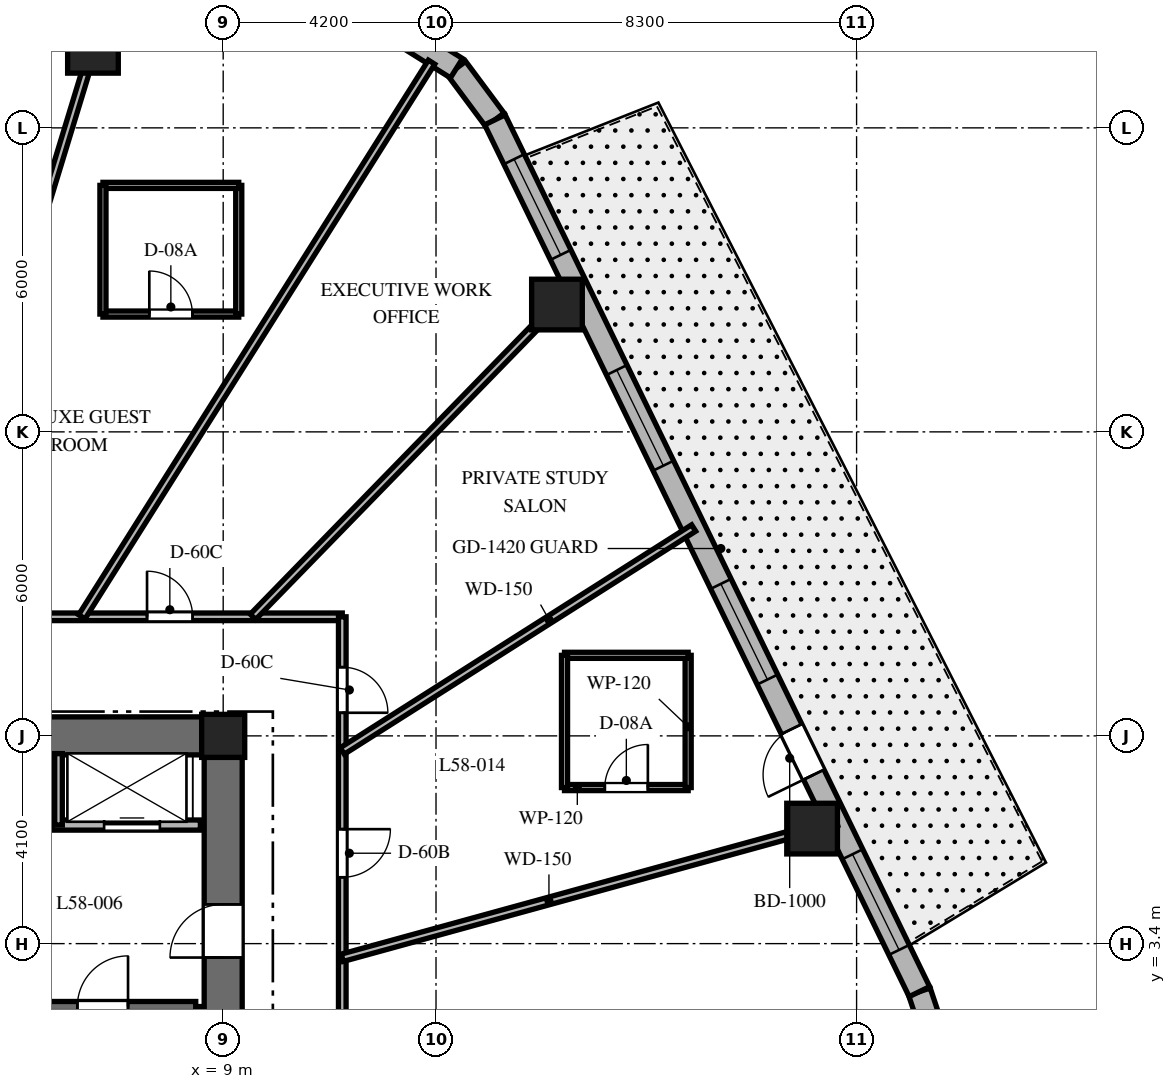
"""IFC4 building model, lengths in metres.
Left out: names, types, materials, properties, quantities, classifications, styles, units other than length and angle.
Written with IfcOpenShell. Run it as: python <this file> out.ifc"""

import sys

from ifc_helpers import new_model, si_unit, direction, frame, frame_2d, origin, origin_2d, place, context, subcontext, project, spatial, rectangle, extrude, element, fill, save


model = new_model("IFC4")
c1 = context("Model", 3, precision=1e-05, world=origin(), true_north=direction((0.0, 1.0)))
c2 = subcontext(c1, "Body", "Model", "MODEL_VIEW")
j1 = project(units=[si_unit("LENGTHUNIT", "METRE"), si_unit("PLANEANGLEUNIT", "RADIAN")], contexts=[c1])
p1 = place(None, origin())
s1 = spatial("IfcSite", under=j1, at=p1, CompositionType="ELEMENT")
p2 = place(p1, origin())
s2 = spatial("IfcBuilding", under=s1, at=p2, CompositionType="ELEMENT")
p3 = place(p2, frame((0.0, 0.0, 233.1)))
s3 = spatial("IfcBuildingStorey", under=s2, at=p3, CompositionType="ELEMENT", Elevation=233.1)
p4 = place(p3, frame((1.85, 7.5, 0.0), z_axis=(0.0, 0.0, 1.0), x_axis=(1.0, 0.0, 0.0)))
e1 = element("IfcWall", 1, at=p4, inside=s3, PredefinedType="SHEAR", context=c2, shape_type="SweptSolid", body=[
    extrude(rectangle(XDim=7.525, YDim=0.75, at=frame_2d((3.762, 0.0))), origin(), (0.0, 0.0, 1.0), 3.8),
])
p5 = place(p3, frame((9.0, -7.125, 0.0), z_axis=(0.0, 0.0, 1.0), x_axis=(0.0, 1.0, 0.0)))
e2 = element("IfcWall", 2, at=p5, inside=s3, PredefinedType="SHEAR", context=c2, shape_type="SweptSolid", body=[
    extrude(rectangle(XDim=14.25, YDim=0.75, at=frame_2d((7.125, 0.0))), origin(), (0.0, 0.0, 1.0), 3.8),
])
p6 = place(p5, frame((10.25, 0.0, 0.0)))
e3 = element("IfcOpeningElement", 3, at=p6, cuts=e2, PredefinedType="OPENING", context=c2, shape_type="SweptSolid", body=[
    extrude(rectangle(XDim=1.05, YDim=2.15, at=frame_2d((0.525, 1.075))), frame((0.0, 0.385, 0.0), z_axis=(0.0, -1.0, 0.0), x_axis=(1.0, 0.0, 0.0)), (0.0, 0.0, 1.0), 0.77),
])
p7 = place(p3, frame((8.458, -6.985, 0.0), z_axis=(0.0, 0.0, 1.0), x_axis=(0.0, 1.0, 0.0)))
e4 = element("IfcWall", 4, at=p7, inside=s3, PredefinedType="SHEAR", context=c2, shape_type="SweptSolid", body=[
    extrude(rectangle(XDim=9.143, YDim=0.2, at=frame_2d((4.572, 0.0))), origin(), (0.0, 0.0, 1.0), 3.8),
])
p8 = place(p3, frame((4.772, 2.158, 0.0), z_axis=(0.0, 0.0, 1.0), x_axis=(1.0, 0.0, 0.0)))
e5 = element("IfcWall", 5, at=p8, inside=s3, PredefinedType="SHEAR", context=c2, shape_type="SweptSolid", body=[
    extrude(rectangle(XDim=3.686, YDim=0.2, at=frame_2d((1.843, 0.0))), origin(), (0.0, 0.0, 1.0), 3.8),
])
p9 = place(p8, frame((1.35, 0.0, 0.0)))
e6 = element("IfcOpeningElement", 6, at=p9, cuts=e5, PredefinedType="OPENING", context=c2, shape_type="SweptSolid", body=[
    extrude(rectangle(XDim=1.0, YDim=2.15, at=frame_2d((0.5, 1.075))), frame((0.0, 0.11, 0.0), z_axis=(0.0, -1.0, 0.0), x_axis=(1.0, 0.0, 0.0)), (0.0, 0.0, 1.0), 0.22),
])
p10 = place(p3, frame((9.0, 7.5, 0.0), z_axis=(0.0, 0.0, 1.0), x_axis=(1.0, 0.0, 0.0)))
e7 = element("IfcColumn", 7, at=p10, inside=s3, PredefinedType="COLUMN", context=c2, shape_type="SweptSolid", body=[
    extrude(rectangle(XDim=0.85, YDim=0.85, at=origin_2d()), origin(), (0.0, 0.0, 1.0), 3.8),
])
for number, where, z_axis, x_axis in (
    (8, (20.622, 5.67, 0.0), (0.0, 0.0, 1.0), (1.0, 0.0, 0.0)),
    (9, (15.587, 16.013, 0.0), (0.0, 0.0, 1.0), (1.0, 0.0, 0.0)),
    (10, (6.43, 21.08, 0.0), (0.0, 0.0, 1.0), (1.0, 0.0, 0.0)),
):
    element("IfcColumn", number, at=place(p3, frame(where, z_axis=z_axis, x_axis=x_axis)), inside=s3, PredefinedType="COLUMN", context=c2, shape_type="SweptSolid", body=[
        extrude(rectangle(XDim=1.0, YDim=1.0, at=origin_2d()), origin(), (0.0, 0.0, 1.0), 3.8),
    ])
p11 = place(p3, frame((23.023, 1.604, 0.0), z_axis=(0.0, 0.0, 1.0), x_axis=(-0.316801227695, 0.948491951537, 0.0)))
e11 = element("IfcWall", 11, at=p11, inside=s3, PredefinedType="SOLIDWALL", context=c2, shape_type="SweptSolid", body=[
    extrude(rectangle(XDim=0.894, YDim=0.45, at=frame_2d((0.447, 0.0))), origin(), (0.0, 0.0, 1.0), 3.5),
])
p12 = place(p3, frame((14.362, 19.658, 0.0), z_axis=(0.0, 0.0, 1.0), x_axis=(-0.596642462792, 0.80250717853, 0.0)))
e12 = element("IfcWall", 12, at=p12, inside=s3, PredefinedType="SOLIDWALL", context=c2, shape_type="SweptSolid", body=[
    extrude(rectangle(XDim=1.27, YDim=0.45, at=frame_2d((0.635, 0.0))), origin(), (0.0, 0.0, 1.0), 3.5),
])
p13 = place(p3, frame((13.604, 20.678, 0.0), z_axis=(0.0, 0.0, 1.0), x_axis=(-0.847910404124, 0.53013955387, 0.0)))
e13 = element("IfcWall", 13, at=p13, inside=s3, PredefinedType="SOLIDWALL", context=c2, shape_type="SweptSolid", body=[
    extrude(rectangle(XDim=1.249, YDim=0.45, at=frame_2d((0.624, 0.0))), origin(), (0.0, 0.0, 1.0), 3.5),
])
p14 = place(p3, frame((22.74, 2.452, 0.0), z_axis=(0.0, 0.0, 1.0), x_axis=(-0.437753424814, 0.899095066755, 0.0)))
e14 = element("IfcWall", 14, at=p14, inside=s3, PredefinedType="SOLIDWALL", context=c2, shape_type="SweptSolid", body=[
    extrude(rectangle(XDim=19.137, YDim=0.45, at=frame_2d((9.569, 0.0))), origin(), (0.0, 0.0, 1.0), 3.5),
])
p15 = place(p14, frame((4.763, 0.0, 0.0)))
e15 = element("IfcOpeningElement", 15, at=p15, cuts=e14, PredefinedType="OPENING", context=c2, shape_type="SweptSolid", body=[
    extrude(rectangle(XDim=1.0, YDim=2.15, at=frame_2d((0.5, 1.075))), frame((0.0, 0.235, 0.0), z_axis=(0.0, -1.0, 0.0), x_axis=(1.0, 0.0, 0.0)), (0.0, 0.0, 1.0), 0.47),
])
p16 = place(p14, frame((6.851, 0.0, 0.8)))
e16 = element("IfcOpeningElement", 16, at=p16, cuts=e14, PredefinedType="OPENING", context=c2, shape_type="SweptSolid", body=[
    extrude(rectangle(XDim=2.1, YDim=1.85, at=frame_2d((1.05, 0.925))), frame((0.0, 0.235, 0.0), z_axis=(0.0, -1.0, 0.0), x_axis=(1.0, 0.0, 0.0)), (0.0, 0.0, 1.0), 0.47),
])
p17 = place(p14, frame((11.545, 0.0, 0.8)))
e17 = element("IfcOpeningElement", 17, at=p17, cuts=e14, PredefinedType="OPENING", context=c2, shape_type="SweptSolid", body=[
    extrude(rectangle(XDim=2.1, YDim=1.85, at=frame_2d((1.05, 0.925))), frame((0.0, 0.235, 0.0), z_axis=(0.0, -1.0, 0.0), x_axis=(1.0, 0.0, 0.0)), (0.0, 0.0, 1.0), 0.47),
])
p18 = place(p14, frame((16.173, 0.0, 0.8)))
e18 = element("IfcOpeningElement", 18, at=p18, cuts=e14, PredefinedType="OPENING", context=c2, shape_type="SweptSolid", body=[
    extrude(rectangle(XDim=2.1, YDim=1.85, at=frame_2d((1.05, 0.925))), frame((0.0, 0.235, 0.0), z_axis=(0.0, -1.0, 0.0), x_axis=(1.0, 0.0, 0.0)), (0.0, 0.0, 1.0), 0.47),
])
p19 = place(p14, frame((0.916, 0.0, 0.8)))
e19 = element("IfcOpeningElement", 19, at=p19, cuts=e14, PredefinedType="OPENING", context=c2, shape_type="SweptSolid", body=[
    extrude(rectangle(XDim=2.1, YDim=1.85, at=frame_2d((1.05, 0.925))), frame((0.0, 0.235, 0.0), z_axis=(0.0, -1.0, 0.0), x_axis=(1.0, 0.0, 0.0)), (0.0, 0.0, 1.0), 0.47),
])
p20 = place(p3, frame((4.5, 5.74, 0.0), z_axis=(0.0, 0.0, 1.0), x_axis=(1.0, 0.0, 0.0)))
e20 = element("IfcWall", 20, at=p20, inside=s3, PredefinedType="PARTITIONING", context=c2, shape_type="SweptSolid", body=[
    extrude(rectangle(XDim=4.05, YDim=0.2, at=frame_2d((2.025, 0.0))), origin(), (0.0, 0.0, 1.0), 3.5),
])
p21 = place(p20, frame((0.3, 0.0, 0.0)))
e21 = element("IfcOpeningElement", 21, at=p21, cuts=e20, PredefinedType="OPENING", context=c2, shape_type="SweptSolid", body=[
    extrude(rectangle(XDim=0.85, YDim=2.03, at=frame_2d((0.425, 1.015))), frame((0.0, 0.11, 0.0), z_axis=(0.0, -1.0, 0.0), x_axis=(1.0, 0.0, 0.0)), (0.0, 0.0, 1.0), 0.22),
])
p22 = place(p20, frame((2.15, 0.0, 0.0)))
e22 = element("IfcOpeningElement", 22, at=p22, cuts=e20, PredefinedType="OPENING", context=c2, shape_type="SweptSolid", body=[
    extrude(rectangle(XDim=1.1, YDim=2.2, at=frame_2d((0.55, 1.1))), frame((0.0, 0.11, 0.0), z_axis=(0.0, -1.0, 0.0), x_axis=(1.0, 0.0, 0.0)), (0.0, 0.0, 1.0), 0.22),
])
p23 = place(p3, frame((5.75, 5.74, 0.0), z_axis=(0.0, 0.0, 1.0), x_axis=(0.0, 1.0, 0.0)))
e23 = element("IfcWall", 23, at=p23, inside=s3, PredefinedType="PARTITIONING", context=c2, shape_type="SweptSolid", body=[
    extrude(rectangle(XDim=1.41, YDim=0.15, at=frame_2d((0.705, 0.0))), origin(), (0.0, 0.0, 1.0), 3.5),
])
p24 = place(p3, frame((0.92, 9.85, 0.0), z_axis=(0.0, 0.0, 1.0), x_axis=(1.0, 0.0, 0.0)))
e24 = element("IfcWall", 24, at=p24, inside=s3, PredefinedType="PARTITIONING", context=c2, shape_type="SweptSolid", body=[
    extrude(rectangle(XDim=10.43, YDim=0.15, at=frame_2d((5.215, 0.0))), origin(), (0.0, 0.0, 1.0), 2.99),
])
p25 = place(p24, frame((6.577, 0.0, 0.0)))
e25 = element("IfcOpeningElement", 25, at=p25, cuts=e24, PredefinedType="OPENING", context=c2, shape_type="SweptSolid", body=[
    extrude(rectangle(XDim=0.9, YDim=2.03, at=frame_2d((0.45, 1.015))), frame((0.0, 0.085, 0.0), z_axis=(0.0, -1.0, 0.0), x_axis=(1.0, 0.0, 0.0)), (0.0, 0.0, 1.0), 0.17),
])
p26 = place(p24, frame((3.234, 0.0, 0.0)))
e26 = element("IfcOpeningElement", 26, at=p26, cuts=e24, PredefinedType="OPENING", context=c2, shape_type="SweptSolid", body=[
    extrude(rectangle(XDim=0.95, YDim=2.03, at=frame_2d((0.475, 1.015))), frame((0.0, 0.085, 0.0), z_axis=(0.0, -1.0, 0.0), x_axis=(1.0, 0.0, 0.0)), (0.0, 0.0, 1.0), 0.17),
])
p27 = place(p3, frame((11.35, 9.85, 0.0), z_axis=(0.0, 0.0, 1.0), x_axis=(0.0, -1.0, 0.0)))
e27 = element("IfcWall", 27, at=p27, inside=s3, PredefinedType="PARTITIONING", context=c2, shape_type="SweptSolid", body=[
    extrude(rectangle(XDim=12.4, YDim=0.15, at=frame_2d((6.2, 0.0))), origin(), (0.0, 0.0, 1.0), 2.99),
])
p28 = place(p27, frame((4.191, 0.0, 0.0)))
e28 = element("IfcOpeningElement", 28, at=p28, cuts=e27, PredefinedType="OPENING", context=c2, shape_type="SweptSolid", body=[
    extrude(rectangle(XDim=0.95, YDim=2.03, at=frame_2d((0.475, 1.015))), frame((0.0, 0.085, 0.0), z_axis=(0.0, -1.0, 0.0), x_axis=(1.0, 0.0, 0.0)), (0.0, 0.0, 1.0), 0.17),
])
p29 = place(p27, frame((0.994, 0.0, 0.0)))
e29 = element("IfcOpeningElement", 29, at=p29, cuts=e27, PredefinedType="OPENING", context=c2, shape_type="SweptSolid", body=[
    extrude(rectangle(XDim=0.9, YDim=2.03, at=frame_2d((0.45, 1.015))), frame((0.0, 0.085, 0.0), z_axis=(0.0, -1.0, 0.0), x_axis=(1.0, 0.0, 0.0)), (0.0, 0.0, 1.0), 0.17),
])
p30 = place(p27, frame((8.835, 0.0, 0.0)))
e30 = element("IfcOpeningElement", 30, at=p30, cuts=e27, PredefinedType="OPENING", context=c2, shape_type="SweptSolid", body=[
    extrude(rectangle(XDim=0.95, YDim=2.03, at=frame_2d((0.475, 1.015))), frame((0.0, 0.085, 0.0), z_axis=(0.0, -1.0, 0.0), x_axis=(1.0, 0.0, 0.0)), (0.0, 0.0, 1.0), 0.17),
])
p31 = place(p3, frame((11.35, 3.121, 0.0), z_axis=(0.0, 0.0, 1.0), x_axis=(0.964212793822, 0.265129568758, 0.0)))
e31 = element("IfcWall", 31, at=p31, inside=s3, PredefinedType="PARTITIONING", context=c2, shape_type="SweptSolid", body=[
    extrude(rectangle(XDim=10.12, YDim=0.15, at=frame_2d((5.06, 0.0))), origin(), (0.0, 0.0, 1.0), 2.74),
])
p32 = place(p3, frame((11.35, 7.202, 0.0), z_axis=(0.0, 0.0, 1.0), x_axis=(0.844364592263, 0.535769013039, 0.0)))
e32 = element("IfcWall", 32, at=p32, inside=s3, PredefinedType="PARTITIONING", context=c2, shape_type="SweptSolid", body=[
    extrude(rectangle(XDim=8.213, YDim=0.15, at=frame_2d((4.106, 0.0))), origin(), (0.0, 0.0, 1.0), 2.74),
])
p33 = place(p3, frame((9.588, 9.85, 0.0), z_axis=(0.0, 0.0, 1.0), x_axis=(0.697519469595, 0.716565830567, 0.0)))
e33 = element("IfcWall", 33, at=p33, inside=s3, PredefinedType="PARTITIONING", context=c2, shape_type="SweptSolid", body=[
    extrude(rectangle(XDim=9.126, YDim=0.15, at=frame_2d((4.563, 0.0))), origin(), (0.0, 0.0, 1.0), 2.74),
])
p34 = place(p3, frame((6.21, 9.85, 0.0), z_axis=(0.0, 0.0, 1.0), x_axis=(0.533335553786, 0.84590376939, 0.0)))
e34 = element("IfcWall", 34, at=p34, inside=s3, PredefinedType="PARTITIONING", context=c2, shape_type="SweptSolid", body=[
    extrude(rectangle(XDim=12.941, YDim=0.15, at=frame_2d((6.47, 0.0))), origin(), (0.0, 0.0, 1.0), 2.74),
])
p35 = place(p3, frame((3.004, 9.85, 0.0), z_axis=(0.0, 0.0, 1.0), x_axis=(0.291775760688, 0.956486751333, 0.0)))
e35 = element("IfcWall", 35, at=p35, inside=s3, PredefinedType="PARTITIONING", context=c2, shape_type="SweptSolid", body=[
    extrude(rectangle(XDim=12.258, YDim=0.15, at=frame_2d((6.129, 0.0))), origin(), (0.0, 0.0, 1.0), 2.74),
])
p36 = place(p3, frame((15.736, 6.48, 0.0), z_axis=(0.0, 0.0, 1.0), x_axis=(1.0, 0.0, 0.0)))
e36 = element("IfcWall", 36, at=p36, inside=s3, PredefinedType="PARTITIONING", context=c2, shape_type="SweptSolid", body=[
    extrude(rectangle(XDim=2.44, YDim=0.12, at=frame_2d((1.22, 0.0))), origin(), (0.0, 0.0, 1.0), 2.99),
])
p37 = place(p36, frame((0.795, 0.0, 0.0)))
e37 = element("IfcOpeningElement", 37, at=p37, cuts=e36, PredefinedType="OPENING", context=c2, shape_type="SweptSolid", body=[
    extrude(rectangle(XDim=0.85, YDim=2.03, at=frame_2d((0.425, 1.015))), frame((0.0, 0.07, 0.0), z_axis=(0.0, -1.0, 0.0), x_axis=(1.0, 0.0, 0.0)), (0.0, 0.0, 1.0), 0.14),
])
p38 = place(p3, frame((18.176, 6.48, 0.0), z_axis=(0.0, 0.0, 1.0), x_axis=(0.0, 1.0, 0.0)))
e38 = element("IfcWall", 38, at=p38, inside=s3, PredefinedType="PARTITIONING", context=c2, shape_type="SweptSolid", body=[
    extrude(rectangle(XDim=2.61, YDim=0.12, at=frame_2d((1.305, 0.0))), origin(), (0.0, 0.0, 1.0), 3.5),
])
p39 = place(p3, frame((18.176, 9.09, 0.0), z_axis=(0.0, 0.0, 1.0), x_axis=(-1.0, 0.0, 0.0)))
e39 = element("IfcWall", 39, at=p39, inside=s3, PredefinedType="PARTITIONING", context=c2, shape_type="SweptSolid", body=[
    extrude(rectangle(XDim=2.44, YDim=0.12, at=frame_2d((1.22, 0.0))), origin(), (0.0, 0.0, 1.0), 3.5),
])
p40 = place(p3, frame((15.736, 9.09, 0.0), z_axis=(0.0, 0.0, 1.0), x_axis=(0.0, -1.0, 0.0)))
e40 = element("IfcWall", 40, at=p40, inside=s3, PredefinedType="PARTITIONING", context=c2, shape_type="SweptSolid", body=[
    extrude(rectangle(XDim=2.61, YDim=0.12, at=frame_2d((1.305, 0.0))), origin(), (0.0, 0.0, 1.0), 2.99),
])
p41 = place(p3, frame((6.627, 15.825, 0.0), z_axis=(0.0, 0.0, 1.0), x_axis=(1.0, 0.0, 0.0)))
e41 = element("IfcWall", 41, at=p41, inside=s3, PredefinedType="PARTITIONING", context=c2, shape_type="SweptSolid", body=[
    extrude(rectangle(XDim=2.68, YDim=0.12, at=frame_2d((1.34, 0.0))), origin(), (0.0, 0.0, 1.0), 3.072),
])
p42 = place(p41, frame((0.915, 0.0, 0.0)))
e42 = element("IfcOpeningElement", 42, at=p42, cuts=e41, PredefinedType="OPENING", context=c2, shape_type="SweptSolid", body=[
    extrude(rectangle(XDim=0.85, YDim=2.03, at=frame_2d((0.425, 1.015))), frame((0.0, 0.07, 0.0), z_axis=(0.0, -1.0, 0.0), x_axis=(1.0, 0.0, 0.0)), (0.0, 0.0, 1.0), 0.14),
])
p43 = place(p3, frame((9.307, 15.825, 0.0), z_axis=(0.0, 0.0, 1.0), x_axis=(0.0, 1.0, 0.0)))
e43 = element("IfcWall", 43, at=p43, inside=s3, PredefinedType="PARTITIONING", context=c2, shape_type="SweptSolid", body=[
    extrude(rectangle(XDim=2.54, YDim=0.12, at=frame_2d((1.27, 0.0))), origin(), (0.0, 0.0, 1.0), 3.5),
])
p44 = place(p3, frame((9.307, 18.365, 0.0), z_axis=(0.0, 0.0, 1.0), x_axis=(-1.0, 0.0, 0.0)))
e44 = element("IfcWall", 44, at=p44, inside=s3, PredefinedType="PARTITIONING", context=c2, shape_type="SweptSolid", body=[
    extrude(rectangle(XDim=2.68, YDim=0.12, at=frame_2d((1.34, 0.0))), origin(), (0.0, 0.0, 1.0), 3.5),
])
p45 = place(p3, frame((6.627, 18.365, 0.0), z_axis=(0.0, 0.0, 1.0), x_axis=(0.0, -1.0, 0.0)))
e45 = element("IfcWall", 45, at=p45, inside=s3, PredefinedType="PARTITIONING", context=c2, shape_type="SweptSolid", body=[
    extrude(rectangle(XDim=2.54, YDim=0.12, at=frame_2d((1.27, 0.0))), origin(), (0.0, 0.0, 1.0), 3.072),
])
p46 = place(p15, origin())
e46 = element("IfcDoor", 46, at=p46, inside=s3, OperationType="SINGLE_SWING_LEFT", PredefinedType="DOOR", context=c2, shape_type="SweptSolid", body=[
    extrude(rectangle(XDim=1.0, YDim=2.15, at=frame_2d((0.5, 1.075))), frame((0.0, 0.025, 0.0), z_axis=(0.0, -1.0, 0.0), x_axis=(1.0, 0.0, 0.0)), (0.0, 0.0, 1.0), 0.05),
])
fill(e15, e46)
p47 = place(p16, origin())
e47 = element("IfcWindow", 47, at=p47, inside=s3, PartitioningType="SINGLE_PANEL", PredefinedType="WINDOW", context=c2, shape_type="SweptSolid", body=[
    extrude(rectangle(XDim=2.1, YDim=1.85, at=frame_2d((1.05, 0.925))), frame((0.0, 0.03, 0.0), z_axis=(0.0, -1.0, 0.0), x_axis=(1.0, 0.0, 0.0)), (0.0, 0.0, 1.0), 0.06),
])
fill(e16, e47)
p48 = place(p17, origin())
e48 = element("IfcWindow", 48, at=p48, inside=s3, PartitioningType="SINGLE_PANEL", PredefinedType="WINDOW", context=c2, shape_type="SweptSolid", body=[
    extrude(rectangle(XDim=2.1, YDim=1.85, at=frame_2d((1.05, 0.925))), frame((0.0, 0.03, 0.0), z_axis=(0.0, -1.0, 0.0), x_axis=(1.0, 0.0, 0.0)), (0.0, 0.0, 1.0), 0.06),
])
fill(e17, e48)
p49 = place(p18, origin())
e49 = element("IfcWindow", 49, at=p49, inside=s3, PartitioningType="SINGLE_PANEL", PredefinedType="WINDOW", context=c2, shape_type="SweptSolid", body=[
    extrude(rectangle(XDim=2.1, YDim=1.85, at=frame_2d((1.05, 0.925))), frame((0.0, 0.03, 0.0), z_axis=(0.0, -1.0, 0.0), x_axis=(1.0, 0.0, 0.0)), (0.0, 0.0, 1.0), 0.06),
])
fill(e18, e49)
p50 = place(p19, origin())
e50 = element("IfcWindow", 50, at=p50, inside=s3, PartitioningType="SINGLE_PANEL", PredefinedType="WINDOW", context=c2, shape_type="SweptSolid", body=[
    extrude(rectangle(XDim=2.1, YDim=1.85, at=frame_2d((1.05, 0.925))), frame((0.0, 0.03, 0.0), z_axis=(0.0, -1.0, 0.0), x_axis=(1.0, 0.0, 0.0)), (0.0, 0.0, 1.0), 0.06),
])
fill(e19, e50)
p51 = place(p9, origin())
e51 = element("IfcDoor", 51, at=p51, inside=s3, OperationType="SINGLE_SWING_RIGHT", PredefinedType="DOOR", context=c2, shape_type="SweptSolid", body=[
    extrude(rectangle(XDim=1.0, YDim=2.15, at=frame_2d((0.5, 1.075))), frame((0.0, 0.025, 0.0), z_axis=(0.0, -1.0, 0.0), x_axis=(1.0, 0.0, 0.0)), (0.0, 0.0, 1.0), 0.05),
])
fill(e6, e51)
p52 = place(p6, origin())
e52 = element("IfcDoor", 52, at=p52, inside=s3, OperationType="SINGLE_SWING_LEFT", PredefinedType="DOOR", context=c2, shape_type="SweptSolid", body=[
    extrude(rectangle(XDim=1.05, YDim=2.15, at=frame_2d((0.525, 1.075))), frame((0.0, 0.025, 0.0), z_axis=(0.0, -1.0, 0.0), x_axis=(1.0, 0.0, 0.0)), (0.0, 0.0, 1.0), 0.05),
])
fill(e3, e52)
p53 = place(p21, origin())
e53 = element("IfcDoor", 53, at=p53, inside=s3, OperationType="SINGLE_SWING_RIGHT", PredefinedType="DOOR", context=c2, shape_type="SweptSolid", body=[
    extrude(rectangle(XDim=0.85, YDim=2.03, at=frame_2d((0.425, 1.015))), frame((0.0, 0.025, 0.0), z_axis=(0.0, -1.0, 0.0), x_axis=(1.0, 0.0, 0.0)), (0.0, 0.0, 1.0), 0.05),
])
fill(e21, e53)
p54 = place(p22, origin())
e54 = element("IfcDoor", 54, at=p54, inside=s3, OperationType="SLIDING_TO_RIGHT", PredefinedType="DOOR", context=c2, shape_type="SweptSolid", body=[
    extrude(rectangle(XDim=1.1, YDim=2.2, at=frame_2d((0.55, 1.1))), frame((0.0, 0.025, 0.0), z_axis=(0.0, -1.0, 0.0), x_axis=(1.0, 0.0, 0.0)), (0.0, 0.0, 1.0), 0.05),
])
fill(e22, e54)
p55 = place(p28, origin())
e55 = element("IfcDoor", 55, at=p55, inside=s3, OperationType="SINGLE_SWING_LEFT", PredefinedType="DOOR", context=c2, shape_type="SweptSolid", body=[
    extrude(rectangle(XDim=0.95, YDim=2.03, at=frame_2d((0.475, 1.015))), frame((0.0, 0.025, 0.0), z_axis=(0.0, -1.0, 0.0), x_axis=(1.0, 0.0, 0.0)), (0.0, 0.0, 1.0), 0.05),
])
fill(e28, e55)
p56 = place(p37, origin())
e56 = element("IfcDoor", 56, at=p56, inside=s3, OperationType="SINGLE_SWING_RIGHT", PredefinedType="DOOR", context=c2, shape_type="SweptSolid", body=[
    extrude(rectangle(XDim=0.85, YDim=2.03, at=frame_2d((0.425, 1.015))), frame((0.0, 0.025, 0.0), z_axis=(0.0, -1.0, 0.0), x_axis=(1.0, 0.0, 0.0)), (0.0, 0.0, 1.0), 0.05),
])
fill(e37, e56)
p57 = place(p29, origin())
e57 = element("IfcDoor", 57, at=p57, inside=s3, OperationType="SINGLE_SWING_RIGHT", PredefinedType="DOOR", context=c2, shape_type="SweptSolid", body=[
    extrude(rectangle(XDim=0.9, YDim=2.03, at=frame_2d((0.45, 1.015))), frame((0.0, 0.025, 0.0), z_axis=(0.0, -1.0, 0.0), x_axis=(1.0, 0.0, 0.0)), (0.0, 0.0, 1.0), 0.05),
])
fill(e29, e57)
p58 = place(p25, origin())
e58 = element("IfcDoor", 58, at=p58, inside=s3, OperationType="SINGLE_SWING_LEFT", PredefinedType="DOOR", context=c2, shape_type="SweptSolid", body=[
    extrude(rectangle(XDim=0.9, YDim=2.03, at=frame_2d((0.45, 1.015))), frame((0.0, 0.025, 0.0), z_axis=(0.0, -1.0, 0.0), x_axis=(1.0, 0.0, 0.0)), (0.0, 0.0, 1.0), 0.05),
])
fill(e25, e58)
p59 = place(p42, origin())
e59 = element("IfcDoor", 59, at=p59, inside=s3, OperationType="SINGLE_SWING_LEFT", PredefinedType="DOOR", context=c2, shape_type="SweptSolid", body=[
    extrude(rectangle(XDim=0.85, YDim=2.03, at=frame_2d((0.425, 1.015))), frame((0.0, 0.025, 0.0), z_axis=(0.0, -1.0, 0.0), x_axis=(1.0, 0.0, 0.0)), (0.0, 0.0, 1.0), 0.05),
])
fill(e42, e59)
save(model, sys.argv[1])
